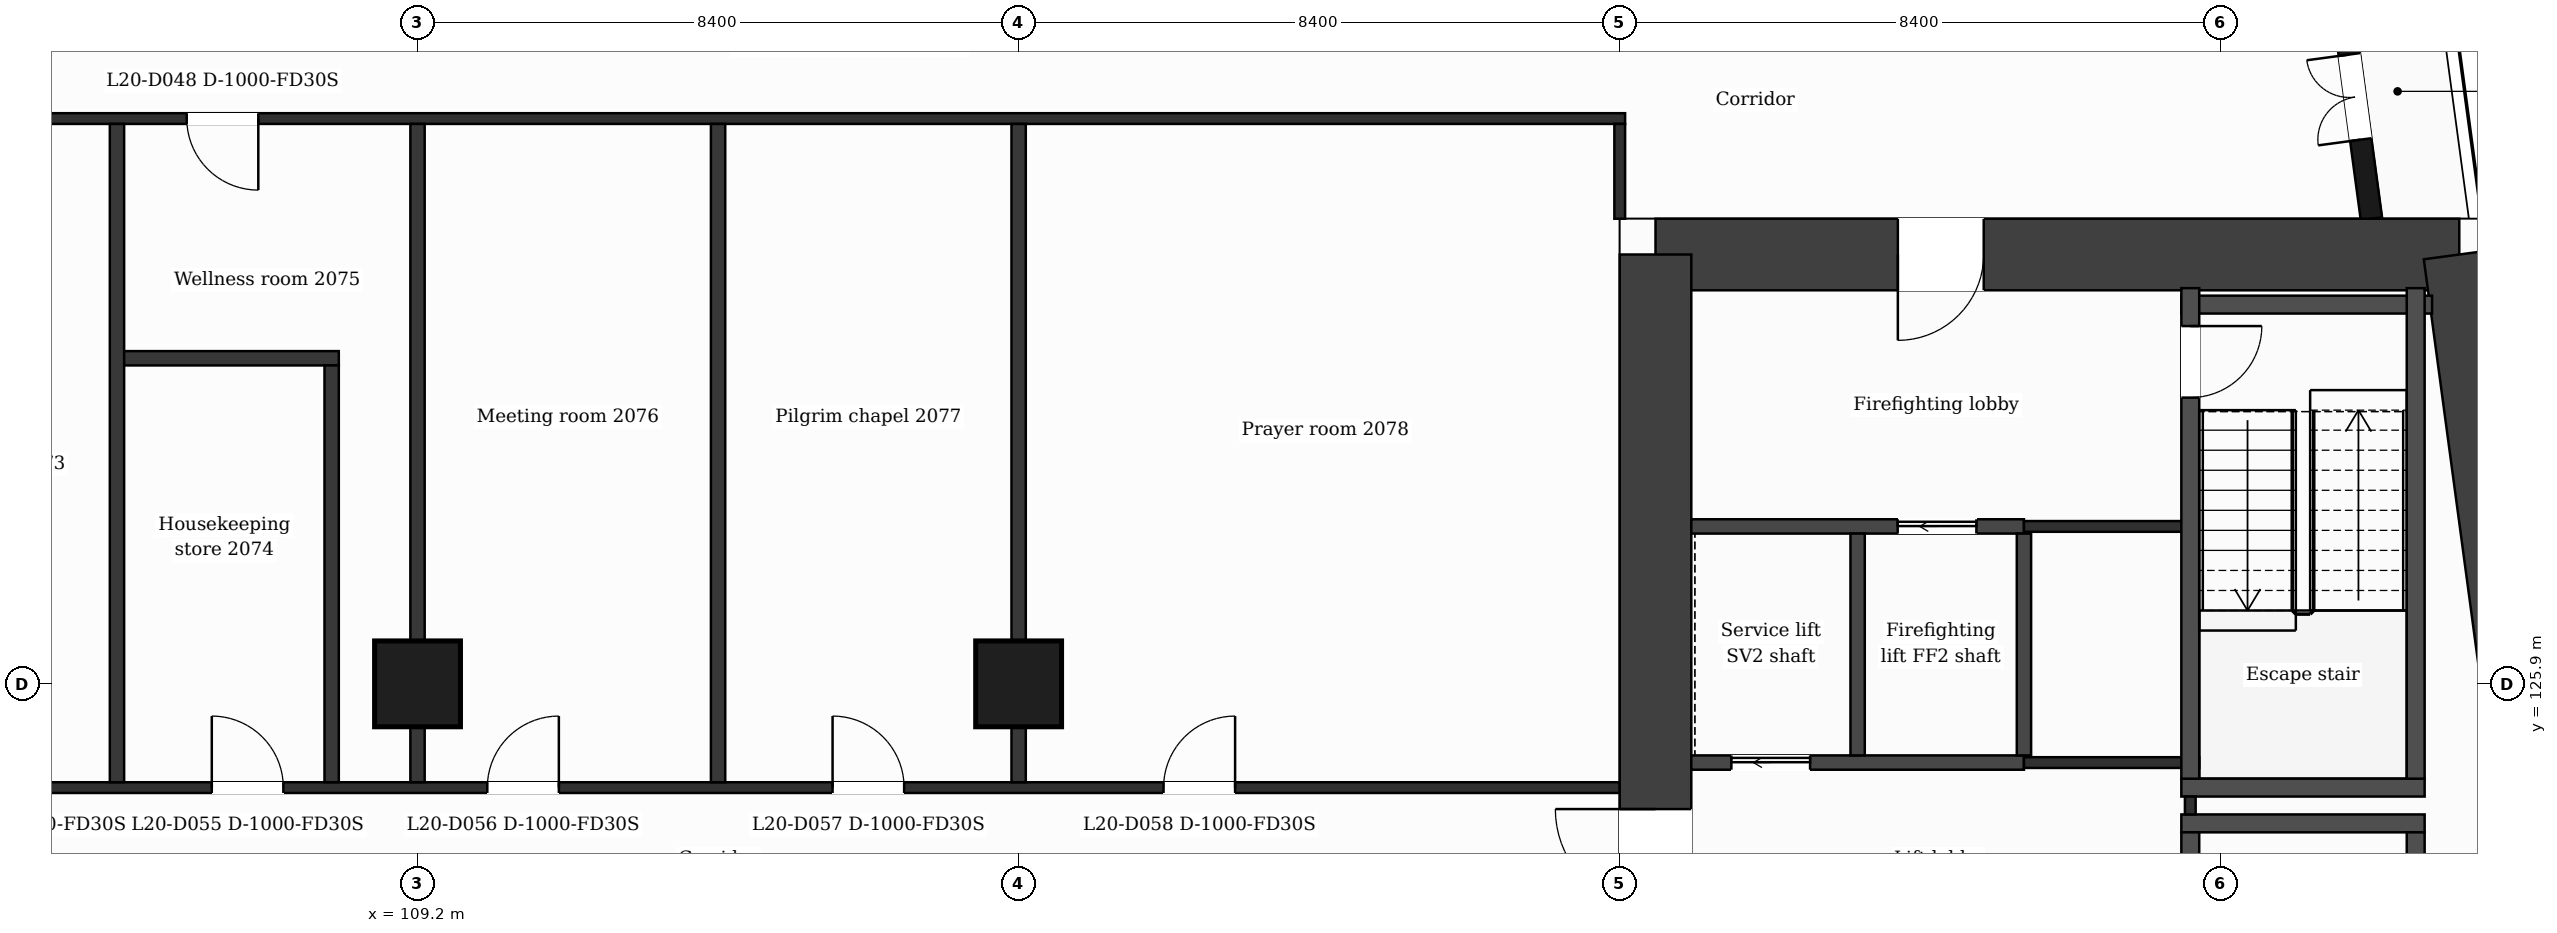
"""IFC4 building model, lengths in metres.
Left out: names, types, materials, properties, quantities, classifications, styles, units other than length and angle.
Written with IfcOpenShell. Run it as: python <this file> out.ifc"""

import sys

from ifc_helpers import new_model, si_unit, direction, frame, frame_2d, origin, origin_2d, place, context, subcontext, project, spatial, rectangle, extrude, element, fill, save


model = new_model("IFC4")
c1 = context("Model", 3, precision=1e-05, world=origin(), true_north=direction((0.0, 1.0)))
c2 = subcontext(c1, "Body", "Model", "MODEL_VIEW")
j1 = project(units=[si_unit("LENGTHUNIT", "METRE"), si_unit("PLANEANGLEUNIT", "RADIAN")], contexts=[c1])
p1 = place(None, origin())
s1 = spatial("IfcSite", under=j1, at=p1, CompositionType="ELEMENT")
p2 = place(p1, origin())
s2 = spatial("IfcBuilding", under=s1, at=p2, CompositionType="ELEMENT")
p3 = place(p2, frame((0.0, 0.0, 91.0)))
s3 = spatial("IfcBuildingStorey", under=s2, at=p3, CompositionType="ELEMENT", Elevation=91.0)
p4 = place(p3, frame((126.5, 131.9, 0.0), z_axis=(0.0, 0.0, 1.0), x_axis=(1.0, 0.0, 0.0)))
e1 = element("IfcWall", 1, at=p4, inside=s3, PredefinedType="SHEAR", context=c2, shape_type="SweptSolid", body=[
    extrude(rectangle(XDim=11.232, YDim=1.0, at=frame_2d((5.616, 0.0))), origin(), (0.0, 0.0, 1.0), 3.7),
])
p5 = place(p4, frame((3.386, 0.0, 0.0)))
e2 = element("IfcOpeningElement", 2, at=p5, cuts=e1, PredefinedType="OPENING", context=c2, shape_type="SweptSolid", body=[
    extrude(rectangle(XDim=1.2, YDim=2.1, at=frame_2d((0.6, 1.05))), frame((0.0, 0.51, 0.0), z_axis=(0.0, -1.0, 0.0), x_axis=(1.0, 0.0, 0.0)), (0.0, 0.0, 1.0), 1.02),
])
p6 = place(p3, frame((137.732, 131.9, 0.0), z_axis=(0.0, 0.0, 1.0), x_axis=(0.133411141623, -0.991060778808, 0.0)))
e3 = element("IfcWall", 3, at=p6, inside=s3, PredefinedType="SHEAR", context=c2, shape_type="SweptSolid", body=[
    extrude(rectangle(XDim=21.189, YDim=1.0, at=frame_2d((10.595, 0.0))), origin(), (0.0, 0.0, 1.0), 3.7),
])
p7 = place(p3, frame((126.5, 110.9, 0.0), z_axis=(0.0, 0.0, 1.0), x_axis=(0.0, 1.0, 0.0)))
e4 = element("IfcWall", 4, at=p7, inside=s3, PredefinedType="SHEAR", context=c2, shape_type="SweptSolid", body=[
    extrude(rectangle(XDim=21.0, YDim=1.0, at=frame_2d((10.5, 0.0))), origin(), (0.0, 0.0, 1.0), 3.7),
])
p8 = place(p7, frame((11.85, 0.0, 0.0)))
e5 = element("IfcOpeningElement", 5, at=p8, cuts=e4, PredefinedType="OPENING", context=c2, shape_type="SweptSolid", body=[
    extrude(rectangle(XDim=1.4, YDim=2.1, at=frame_2d((0.7, 1.05))), frame((0.0, 0.51, 0.0), z_axis=(0.0, -1.0, 0.0), x_axis=(1.0, 0.0, 0.0)), (0.0, 0.0, 1.0), 1.02),
])
for number, where, z_axis, x_axis in (
    (6, (109.2, 125.9, 0.0), (0.0, 0.0, 1.0), (1.0, 0.0, 0.0)),
    (7, (117.6, 125.9, 0.0), (0.0, 0.0, 1.0), (1.0, 0.0, 0.0)),
):
    element("IfcColumn", number, at=place(p3, frame(where, z_axis=z_axis, x_axis=x_axis)), inside=s3, PredefinedType="COLUMN", context=c2, shape_type="SweptSolid", body=[
        extrude(rectangle(XDim=1.2, YDim=1.2, at=origin_2d()), origin(), (0.0, 0.0, 1.0), 3.7),
    ])
p9 = place(p3, frame((136.504, 132.4, 0.0), z_axis=(0.0, 0.0, 1.0), x_axis=(-0.133399697462, 0.99106231929, 0.0)))
e8 = element("IfcWall", 8, at=p9, inside=s3, PredefinedType="SOLIDWALL", context=c2, shape_type="SweptSolid", body=[
    extrude(rectangle(XDim=6.74, YDim=0.3, at=frame_2d((3.37, 0.0))), origin(), (0.0, 0.0, 1.0), 3.38),
])
p10 = place(p9, frame((1.115, 0.0, 0.0)))
e9 = element("IfcOpeningElement", 9, at=p10, cuts=e8, PredefinedType="OPENING", context=c2, shape_type="SweptSolid", body=[
    extrude(rectangle(XDim=1.2, YDim=2.4, at=frame_2d((0.6, 1.2))), frame((0.0, 0.16, 0.0), z_axis=(0.0, -1.0, 0.0), x_axis=(1.0, 0.0, 0.0)), (0.0, 0.0, 1.0), 0.32),
])
p11 = place(p9, frame((3.835, 0.0, 0.9)))
e10 = element("IfcOpeningElement", 10, at=p11, cuts=e8, PredefinedType="OPENING", context=c2, shape_type="SweptSolid", body=[
    extrude(rectangle(XDim=2.4, YDim=2.1, at=frame_2d((1.2, 1.05))), frame((0.0, 0.16, 0.0), z_axis=(0.0, -1.0, 0.0), x_axis=(1.0, 0.0, 0.0)), (0.0, 0.0, 1.0), 0.32),
])
for number, where, z_axis, x_axis in (
    (11, (133.848, 123.95, 0.0), (0.0, 0.0, 1.0), (1.0, 0.0, 0.0)),
    (12, (133.848, 124.45, 0.0), (0.0, 0.0, 1.0), (1.0, 0.0, 0.0)),
):
    element("IfcWall", number, at=place(p3, frame(where, z_axis=z_axis, x_axis=x_axis)), inside=s3, PredefinedType="PARTITIONING", context=c2, shape_type="SweptSolid", body=[
        extrude(rectangle(XDim=3.4, YDim=0.25, at=frame_2d((1.7, 0.0))), origin(), (0.0, 0.0, 1.0), 3.38),
    ])
p12 = place(p3, frame((100.8, 124.45, 0.0), z_axis=(0.0, 0.0, 1.0), x_axis=(1.0, 0.0, 0.0)))
e13 = element("IfcWall", 13, at=p12, inside=s3, PredefinedType="PARTITIONING", context=c2, shape_type="SweptSolid", body=[
    extrude(rectangle(XDim=25.2, YDim=0.15, at=frame_2d((12.6, 0.0))), origin(), (0.0, 0.0, 1.0), 3.38),
])
p13 = place(p12, frame((1.6, 0.0, 0.0)))
e14 = element("IfcOpeningElement", 14, at=p13, cuts=e13, PredefinedType="OPENING", context=c2, shape_type="SweptSolid", body=[
    extrude(rectangle(XDim=1.0, YDim=2.1, at=frame_2d((0.5, 1.05))), frame((0.0, 0.085, 0.0), z_axis=(0.0, -1.0, 0.0), x_axis=(1.0, 0.0, 0.0)), (0.0, 0.0, 1.0), 0.17),
])
p14 = place(p12, frame((5.525, 0.0, 0.0)))
e15 = element("IfcOpeningElement", 15, at=p14, cuts=e13, PredefinedType="OPENING", context=c2, shape_type="SweptSolid", body=[
    extrude(rectangle(XDim=1.0, YDim=2.1, at=frame_2d((0.5, 1.05))), frame((0.0, 0.085, 0.0), z_axis=(0.0, -1.0, 0.0), x_axis=(1.0, 0.0, 0.0)), (0.0, 0.0, 1.0), 0.17),
])
p15 = place(p12, frame((9.375, 0.0, 0.0)))
e16 = element("IfcOpeningElement", 16, at=p15, cuts=e13, PredefinedType="OPENING", context=c2, shape_type="SweptSolid", body=[
    extrude(rectangle(XDim=1.0, YDim=2.1, at=frame_2d((0.5, 1.05))), frame((0.0, 0.085, 0.0), z_axis=(0.0, -1.0, 0.0), x_axis=(1.0, 0.0, 0.0)), (0.0, 0.0, 1.0), 0.17),
])
p16 = place(p12, frame((14.2, 0.0, 0.0)))
e17 = element("IfcOpeningElement", 17, at=p16, cuts=e13, PredefinedType="OPENING", context=c2, shape_type="SweptSolid", body=[
    extrude(rectangle(XDim=1.0, YDim=2.1, at=frame_2d((0.5, 1.05))), frame((0.0, 0.085, 0.0), z_axis=(0.0, -1.0, 0.0), x_axis=(1.0, 0.0, 0.0)), (0.0, 0.0, 1.0), 0.17),
])
p17 = place(p12, frame((18.825, 0.0, 0.0)))
e18 = element("IfcOpeningElement", 18, at=p17, cuts=e13, PredefinedType="OPENING", context=c2, shape_type="SweptSolid", body=[
    extrude(rectangle(XDim=1.0, YDim=2.1, at=frame_2d((0.5, 1.05))), frame((0.0, 0.085, 0.0), z_axis=(0.0, -1.0, 0.0), x_axis=(1.0, 0.0, 0.0)), (0.0, 0.0, 1.0), 0.17),
])
p18 = place(p3, frame((127.0, 124.8, 0.0), z_axis=(0.0, 0.0, 1.0), x_axis=(1.0, 0.0, 0.0)))
e19 = element("IfcWall", 19, at=p18, inside=s3, PredefinedType="PARTITIONING", context=c2, shape_type="SweptSolid", body=[
    extrude(rectangle(XDim=4.649, YDim=0.2, at=frame_2d((2.324, 0.0))), origin(), (0.0, 0.0, 1.0), 3.38),
])
p19 = place(p18, frame((0.56, 0.0, 0.0)))
e20 = element("IfcOpeningElement", 20, at=p19, cuts=e19, PredefinedType="OPENING", context=c2, shape_type="SweptSolid", body=[
    extrude(rectangle(XDim=1.1, YDim=2.1, at=frame_2d((0.55, 1.05))), frame((0.0, 0.11, 0.0), z_axis=(0.0, -1.0, 0.0), x_axis=(1.0, 0.0, 0.0)), (0.0, 0.0, 1.0), 0.22),
])
p20 = place(p3, frame((131.649, 124.8, 0.0), z_axis=(0.0, 0.0, 1.0), x_axis=(1.0, 0.0, 0.0)))
e21 = element("IfcWall", 21, at=p20, inside=s3, PredefinedType="PARTITIONING", context=c2, shape_type="SweptSolid", body=[
    extrude(rectangle(XDim=2.449, YDim=0.15, at=frame_2d((1.225, 0.0))), origin(), (0.0, 0.0, 1.0), 3.38),
])
p21 = place(p3, frame((127.0, 128.1, 0.0), z_axis=(0.0, 0.0, 1.0), x_axis=(1.0, 0.0, 0.0)))
e22 = element("IfcWall", 22, at=p21, inside=s3, PredefinedType="PARTITIONING", context=c2, shape_type="SweptSolid", body=[
    extrude(rectangle(XDim=4.649, YDim=0.2, at=frame_2d((2.324, 0.0))), origin(), (0.0, 0.0, 1.0), 3.38),
])
p22 = place(p21, frame((2.884, 0.0, 0.0)))
e23 = element("IfcOpeningElement", 23, at=p22, cuts=e22, PredefinedType="OPENING", context=c2, shape_type="SweptSolid", body=[
    extrude(rectangle(XDim=1.1, YDim=2.1, at=frame_2d((0.55, 1.05))), frame((0.0, 0.11, 0.0), z_axis=(0.0, -1.0, 0.0), x_axis=(1.0, 0.0, 0.0)), (0.0, 0.0, 1.0), 0.22),
])
p23 = place(p3, frame((131.649, 128.1, 0.0), z_axis=(0.0, 0.0, 1.0), x_axis=(1.0, 0.0, 0.0)))
e24 = element("IfcWall", 24, at=p23, inside=s3, PredefinedType="PARTITIONING", context=c2, shape_type="SweptSolid", body=[
    extrude(rectangle(XDim=2.324, YDim=0.15, at=frame_2d((1.162, 0.0))), origin(), (0.0, 0.0, 1.0), 3.38),
])
p24 = place(p3, frame((105.0, 130.45, 0.0), z_axis=(0.0, 0.0, 1.0), x_axis=(1.0, 0.0, 0.0)))
e25 = element("IfcWall", 25, at=p24, inside=s3, PredefinedType="PARTITIONING", context=c2, shape_type="SweptSolid", body=[
    extrude(rectangle(XDim=3.1, YDim=0.2, at=frame_2d((1.55, 0.0))), origin(), (0.0, 0.0, 1.0), 3.38),
])
p25 = place(p3, frame((133.848, 131.2, 0.0), z_axis=(0.0, 0.0, 1.0), x_axis=(1.0, 0.0, 0.0)))
e26 = element("IfcWall", 26, at=p25, inside=s3, PredefinedType="PARTITIONING", context=c2, shape_type="SweptSolid", body=[
    extrude(rectangle(XDim=3.504, YDim=0.25, at=frame_2d((1.752, 0.0))), origin(), (0.0, 0.0, 1.0), 3.38),
])
p26 = place(p3, frame((100.725, 133.8, 0.0), z_axis=(0.0, 0.0, 1.0), x_axis=(1.0, 0.0, 0.0)))
e27 = element("IfcWall", 27, at=p26, inside=s3, PredefinedType="PARTITIONING", context=c2, shape_type="SweptSolid", body=[
    extrude(rectangle(XDim=25.35, YDim=0.15, at=frame_2d((12.675, 0.0))), origin(), (0.0, 0.0, 1.0), 3.38),
])
p27 = place(p26, frame((5.25, 0.0, 0.0)))
e28 = element("IfcOpeningElement", 28, at=p27, cuts=e27, PredefinedType="OPENING", context=c2, shape_type="SweptSolid", body=[
    extrude(rectangle(XDim=1.0, YDim=2.1, at=frame_2d((0.5, 1.05))), frame((0.0, 0.085, 0.0), z_axis=(0.0, -1.0, 0.0), x_axis=(1.0, 0.0, 0.0)), (0.0, 0.0, 1.0), 0.17),
])
p28 = place(p3, frame((105.0, 124.525, 0.0), z_axis=(0.0, 0.0, 1.0), x_axis=(0.0, 1.0, 0.0)))
e29 = element("IfcWall", 29, at=p28, inside=s3, PredefinedType="PARTITIONING", context=c2, shape_type="SweptSolid", body=[
    extrude(rectangle(XDim=9.2, YDim=0.2, at=frame_2d((4.6, 0.0))), origin(), (0.0, 0.0, 1.0), 3.38),
])
p29 = place(p3, frame((108.0, 124.525, 0.0), z_axis=(0.0, 0.0, 1.0), x_axis=(0.0, 1.0, 0.0)))
e30 = element("IfcWall", 30, at=p29, inside=s3, PredefinedType="PARTITIONING", context=c2, shape_type="SweptSolid", body=[
    extrude(rectangle(XDim=5.825, YDim=0.2, at=frame_2d((2.913, 0.0))), origin(), (0.0, 0.0, 1.0), 3.38),
])
for number, where, z_axis, x_axis in (
    (31, (109.2, 124.525, 0.0), (0.0, 0.0, 1.0), (0.0, 1.0, 0.0)),
    (32, (113.4, 124.525, 0.0), (0.0, 0.0, 1.0), (0.0, 1.0, 0.0)),
    (33, (117.6, 124.525, 0.0), (0.0, 0.0, 1.0), (0.0, 1.0, 0.0)),
):
    element("IfcWall", number, at=place(p3, frame(where, z_axis=z_axis, x_axis=x_axis)), inside=s3, PredefinedType="PARTITIONING", context=c2, shape_type="SweptSolid", body=[
        extrude(rectangle(XDim=9.2, YDim=0.2, at=frame_2d((4.6, 0.0))), origin(), (0.0, 0.0, 1.0), 3.38),
    ])
p30 = place(p3, frame((126.0, 132.4, 0.0), z_axis=(0.0, 0.0, 1.0), x_axis=(0.0, 1.0, 0.0)))
e34 = element("IfcWall", 34, at=p30, inside=s3, PredefinedType="PARTITIONING", context=c2, shape_type="SweptSolid", body=[
    extrude(rectangle(XDim=1.325, YDim=0.15, at=frame_2d((0.663, 0.0))), origin(), (0.0, 0.0, 1.0), 3.38),
])
for number, where, z_axis, x_axis in (
    (35, (129.324, 124.9, 0.0), (0.0, 0.0, 1.0), (0.0, 1.0, 0.0)),
    (36, (131.649, 124.9, 0.0), (0.0, 0.0, 1.0), (0.0, 1.0, 0.0)),
):
    element("IfcWall", number, at=place(p3, frame(where, z_axis=z_axis, x_axis=x_axis)), inside=s3, PredefinedType="PARTITIONING", context=c2, shape_type="SweptSolid", body=[
        extrude(rectangle(XDim=3.1, YDim=0.2, at=frame_2d((1.55, 0.0))), origin(), (0.0, 0.0, 1.0), 3.38),
    ])
p31 = place(p3, frame((133.973, 124.075, 0.0), z_axis=(0.0, 0.0, 1.0), x_axis=(0.0, 1.0, 0.0)))
e37 = element("IfcWall", 37, at=p31, inside=s3, PredefinedType="PARTITIONING", context=c2, shape_type="SweptSolid", body=[
    extrude(rectangle(XDim=0.25, YDim=0.15, at=frame_2d((0.125, 0.0))), origin(), (0.0, 0.0, 1.0), 3.38),
])
p32 = place(p3, frame((133.973, 116.97, 0.0), z_axis=(0.0, 0.0, 1.0), x_axis=(0.0, 1.0, 0.0)))
e38 = element("IfcWall", 38, at=p32, inside=s3, PredefinedType="PARTITIONING", context=c2, shape_type="SweptSolid", body=[
    extrude(rectangle(XDim=6.855, YDim=0.25, at=frame_2d((3.427, 0.0))), origin(), (0.0, 0.0, 1.0), 3.38),
])
p33 = place(p32, frame((5.555, 0.0, 0.0)))
e39 = element("IfcOpeningElement", 39, at=p33, cuts=e38, PredefinedType="OPENING", context=c2, shape_type="SweptSolid", body=[
    extrude(rectangle(XDim=0.95, YDim=2.1, at=frame_2d((0.475, 1.05))), frame((0.0, 0.135, 0.0), z_axis=(0.0, -1.0, 0.0), x_axis=(1.0, 0.0, 0.0)), (0.0, 0.0, 1.0), 0.27),
])
p34 = place(p3, frame((133.973, 124.575, 0.0), z_axis=(0.0, 0.0, 1.0), x_axis=(0.0, 1.0, 0.0)))
e40 = element("IfcWall", 40, at=p34, inside=s3, PredefinedType="PARTITIONING", context=c2, shape_type="SweptSolid", body=[
    extrude(rectangle(XDim=6.855, YDim=0.25, at=frame_2d((3.427, 0.0))), origin(), (0.0, 0.0, 1.0), 3.38),
])
p35 = place(p34, frame((5.325, 0.0, 0.0)))
e41 = element("IfcOpeningElement", 41, at=p35, cuts=e40, PredefinedType="OPENING", context=c2, shape_type="SweptSolid", body=[
    extrude(rectangle(XDim=1.0, YDim=2.1, at=frame_2d((0.5, 1.05))), frame((0.0, 0.135, 0.0), z_axis=(0.0, -1.0, 0.0), x_axis=(1.0, 0.0, 0.0)), (0.0, 0.0, 1.0), 0.27),
])
for number, where, z_axis, x_axis in (
    (42, (137.123, 116.97, 0.0), (0.0, 0.0, 1.0), (0.0, 1.0, 0.0)),
    (43, (137.123, 124.575, 0.0), (0.0, 0.0, 1.0), (0.0, 1.0, 0.0)),
):
    element("IfcWall", number, at=place(p3, frame(where, z_axis=z_axis, x_axis=x_axis)), inside=s3, PredefinedType="PARTITIONING", context=c2, shape_type="SweptSolid", body=[
        extrude(rectangle(XDim=6.855, YDim=0.25, at=frame_2d((3.427, 0.0))), origin(), (0.0, 0.0, 1.0), 3.38),
    ])
p36 = place(p10, origin())
e44 = element("IfcDoor", 44, at=p36, inside=s3, OperationType="DOUBLE_DOOR_SINGLE_SWING", PredefinedType="DOOR", context=c2, shape_type="SweptSolid", body=[
    extrude(rectangle(XDim=1.2, YDim=2.4, at=frame_2d((0.6, 1.2))), frame((0.0, 0.025, 0.0), z_axis=(0.0, -1.0, 0.0), x_axis=(1.0, 0.0, 0.0)), (0.0, 0.0, 1.0), 0.05),
])
fill(e9, e44)
p37 = place(p22, origin())
e45 = element("IfcDoor", 45, at=p37, inside=s3, OperationType="SLIDING_TO_LEFT", PredefinedType="DOOR", context=c2, shape_type="SweptSolid", body=[
    extrude(rectangle(XDim=1.1, YDim=2.1, at=frame_2d((0.55, 1.05))), frame((0.0, 0.025, 0.0), z_axis=(0.0, -1.0, 0.0), x_axis=(1.0, 0.0, 0.0)), (0.0, 0.0, 1.0), 0.05),
])
fill(e23, e45)
p38 = place(p19, origin())
e46 = element("IfcDoor", 46, at=p38, inside=s3, OperationType="SLIDING_TO_LEFT", PredefinedType="DOOR", context=c2, shape_type="SweptSolid", body=[
    extrude(rectangle(XDim=1.1, YDim=2.1, at=frame_2d((0.55, 1.05))), frame((0.0, 0.025, 0.0), z_axis=(0.0, -1.0, 0.0), x_axis=(1.0, 0.0, 0.0)), (0.0, 0.0, 1.0), 0.05),
])
fill(e20, e46)
p39 = place(p35, origin())
e47 = element("IfcDoor", 47, at=p39, inside=s3, OperationType="SINGLE_SWING_RIGHT", PredefinedType="DOOR", context=c2, shape_type="SweptSolid", body=[
    extrude(rectangle(XDim=1.0, YDim=2.1, at=frame_2d((0.5, 1.05))), frame((0.0, 0.025, 0.0), z_axis=(0.0, -1.0, 0.0), x_axis=(1.0, 0.0, 0.0)), (0.0, 0.0, 1.0), 0.05),
])
fill(e41, e47)
p40 = place(p27, origin())
e48 = element("IfcDoor", 48, at=p40, inside=s3, OperationType="SINGLE_SWING_RIGHT", PredefinedType="DOOR", context=c2, shape_type="SweptSolid", body=[
    extrude(rectangle(XDim=1.0, YDim=2.1, at=frame_2d((0.5, 1.05))), frame((0.0, 0.025, 0.0), z_axis=(0.0, -1.0, 0.0), x_axis=(1.0, 0.0, 0.0)), (0.0, 0.0, 1.0), 0.05),
])
fill(e28, e48)
p41 = place(p14, origin())
e49 = element("IfcDoor", 49, at=p41, inside=s3, OperationType="SINGLE_SWING_LEFT", PredefinedType="DOOR", context=c2, shape_type="SweptSolid", body=[
    extrude(rectangle(XDim=1.0, YDim=2.1, at=frame_2d((0.5, 1.05))), frame((0.0, 0.025, 0.0), z_axis=(0.0, -1.0, 0.0), x_axis=(1.0, 0.0, 0.0)), (0.0, 0.0, 1.0), 0.05),
])
fill(e15, e49)
p42 = place(p15, origin())
e50 = element("IfcDoor", 50, at=p42, inside=s3, OperationType="SINGLE_SWING_RIGHT", PredefinedType="DOOR", context=c2, shape_type="SweptSolid", body=[
    extrude(rectangle(XDim=1.0, YDim=2.1, at=frame_2d((0.5, 1.05))), frame((0.0, 0.025, 0.0), z_axis=(0.0, -1.0, 0.0), x_axis=(1.0, 0.0, 0.0)), (0.0, 0.0, 1.0), 0.05),
])
fill(e16, e50)
p43 = place(p16, origin())
e51 = element("IfcDoor", 51, at=p43, inside=s3, OperationType="SINGLE_SWING_LEFT", PredefinedType="DOOR", context=c2, shape_type="SweptSolid", body=[
    extrude(rectangle(XDim=1.0, YDim=2.1, at=frame_2d((0.5, 1.05))), frame((0.0, 0.025, 0.0), z_axis=(0.0, -1.0, 0.0), x_axis=(1.0, 0.0, 0.0)), (0.0, 0.0, 1.0), 0.05),
])
fill(e17, e51)
p44 = place(p17, origin())
e52 = element("IfcDoor", 52, at=p44, inside=s3, OperationType="SINGLE_SWING_RIGHT", PredefinedType="DOOR", context=c2, shape_type="SweptSolid", body=[
    extrude(rectangle(XDim=1.0, YDim=2.1, at=frame_2d((0.5, 1.05))), frame((0.0, 0.025, 0.0), z_axis=(0.0, -1.0, 0.0), x_axis=(1.0, 0.0, 0.0)), (0.0, 0.0, 1.0), 0.05),
])
fill(e18, e52)
p45 = place(p5, origin())
e53 = element("IfcDoor", 53, at=p45, inside=s3, OperationType="SINGLE_SWING_LEFT", PredefinedType="DOOR", context=c2, shape_type="SweptSolid", body=[
    extrude(rectangle(XDim=1.2, YDim=2.1, at=frame_2d((0.6, 1.05))), frame((0.0, 0.025, 0.0), z_axis=(0.0, -1.0, 0.0), x_axis=(1.0, 0.0, 0.0)), (0.0, 0.0, 1.0), 0.05),
])
fill(e2, e53)
p46 = place(p8, origin())
e54 = element("IfcDoor", 54, at=p46, inside=s3, OperationType="SINGLE_SWING_RIGHT", PredefinedType="DOOR", context=c2, shape_type="SweptSolid", body=[
    extrude(rectangle(XDim=1.4, YDim=2.1, at=frame_2d((0.7, 1.05))), frame((0.0, 0.025, 0.0), z_axis=(0.0, -1.0, 0.0), x_axis=(1.0, 0.0, 0.0)), (0.0, 0.0, 1.0), 0.05),
])
fill(e5, e54)
save(model, sys.argv[1])
